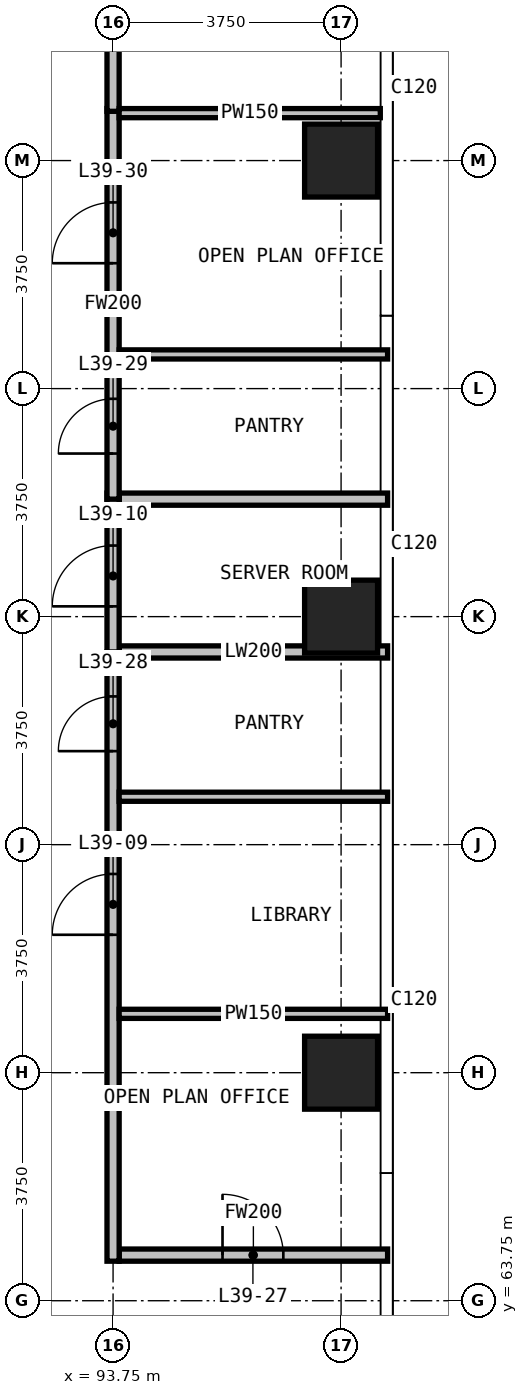
"""IFC4 building model, lengths in metres.
Left out: names, types, materials, properties, quantities, classifications, styles, units other than length and angle.
Written with IfcOpenShell. Run it as: python <this file> out.ifc"""

import sys

from ifc_helpers import new_model, si_unit, direction, frame, frame_2d, origin, origin_2d, place, context, subcontext, project, spatial, rectangle, extrude, element, fill, save


model = new_model("IFC4")
c1 = context("Model", 3, precision=1e-05, world=origin(), true_north=direction((0.0, 1.0)))
c2 = subcontext(c1, "Body", "Model", "MODEL_VIEW")
j1 = project(units=[si_unit("LENGTHUNIT", "METRE"), si_unit("PLANEANGLEUNIT", "RADIAN")], contexts=[c1])
p1 = place(None, origin())
s1 = spatial("IfcSite", under=j1, at=p1, CompositionType="ELEMENT")
p2 = place(p1, origin())
s2 = spatial("IfcBuilding", under=s1, at=p2, CompositionType="ELEMENT")
p3 = place(p2, frame((0.0, 0.0, 154.9)))
s3 = spatial("IfcBuildingStorey", under=s2, at=p3, CompositionType="ELEMENT", Elevation=154.9)
for number, where, z_axis, x_axis in (
    (1, (97.5, 67.5, 0.0), (0.0, 0.0, 1.0), (1.0, 0.0, 0.0)),
    (2, (97.5, 75.0, 0.0), (0.0, 0.0, 1.0), (1.0, 0.0, 0.0)),
    (3, (97.5, 82.5, 0.0), (0.0, 0.0, 1.0), (1.0, 0.0, 0.0)),
):
    element("IfcColumn", number, at=place(p3, frame(where, z_axis=z_axis, x_axis=x_axis)), inside=s3, PredefinedType="COLUMN", context=c2, shape_type="SweptSolid", body=[
        extrude(rectangle(XDim=1.2, YDim=1.2, at=origin_2d()), origin(), (0.0, 0.0, 1.0), 3.6),
    ])
for number, where, z_axis, x_axis in (
    (4, (93.85, 74.419, 0.0), (0.0, 0.0, 1.0), (1.0, 0.0, 0.0)),
    (5, (93.85, 76.932, 0.0), (0.0, 0.0, 1.0), (1.0, 0.0, 0.0)),
):
    element("IfcWall", number, at=place(p3, frame(where, z_axis=z_axis, x_axis=x_axis)), inside=s3, PredefinedType="PARTITIONING", context=c2, shape_type="SweptSolid", body=[
        extrude(rectangle(XDim=4.415, YDim=0.2, at=frame_2d((2.208, 0.0))), origin(), (0.0, 0.0, 1.0), 3.3),
    ])
p4 = place(p3, frame((93.75, 74.319, 0.0), z_axis=(0.0, 0.0, 1.0), x_axis=(0.0, 1.0, 0.0)))
e6 = element("IfcWall", 6, at=p4, inside=s3, PredefinedType="PARTITIONING", context=c2, shape_type="SweptSolid", body=[
    extrude(rectangle(XDim=2.713, YDim=0.2, at=frame_2d((1.356, 0.0))), origin(), (0.0, 0.0, 1.0), 3.3),
])
p5 = place(p4, frame((0.85, 0.0, 0.0)))
e7 = element("IfcOpeningElement", 7, at=p5, cuts=e6, PredefinedType="OPENING", context=c2, shape_type="SweptSolid", body=[
    extrude(rectangle(XDim=1.0, YDim=2.2, at=frame_2d((0.5, 1.1))), frame((0.0, 0.11, 0.0), z_axis=(0.0, -1.0, 0.0), x_axis=(1.0, 0.0, 0.0)), (0.0, 0.0, 1.0), 0.22),
])
p6 = place(p3, frame((93.85, 64.5, 0.0), z_axis=(0.0, 0.0, 1.0), x_axis=(1.0, 0.0, 0.0)))
e8 = element("IfcWall", 8, at=p6, inside=s3, PredefinedType="PARTITIONING", context=c2, shape_type="SweptSolid", body=[
    extrude(rectangle(XDim=4.415, YDim=0.2, at=frame_2d((2.208, 0.0))), origin(), (0.0, 0.0, 1.0), 3.3),
])
p7 = place(p6, frame((1.7, 0.0, 0.0)))
e9 = element("IfcOpeningElement", 9, at=p7, cuts=e8, PredefinedType="OPENING", context=c2, shape_type="SweptSolid", body=[
    extrude(rectangle(XDim=1.0, YDim=2.2, at=frame_2d((0.5, 1.1))), frame((0.0, 0.11, 0.0), z_axis=(0.0, -1.0, 0.0), x_axis=(1.0, 0.0, 0.0)), (0.0, 0.0, 1.0), 0.22),
])
p8 = place(p3, frame((93.75, 64.4, 0.0), z_axis=(0.0, 0.0, 1.0), x_axis=(0.0, 1.0, 0.0)))
e10 = element("IfcWall", 10, at=p8, inside=s3, PredefinedType="PARTITIONING", context=c2, shape_type="SweptSolid", body=[
    extrude(rectangle(XDim=10.019, YDim=0.2, at=frame_2d((5.01, 0.0))), origin(), (0.0, 0.0, 1.0), 3.3),
])
p9 = place(p8, frame((5.368, 0.0, 0.0)))
e11 = element("IfcOpeningElement", 11, at=p9, cuts=e10, PredefinedType="OPENING", context=c2, shape_type="SweptSolid", body=[
    extrude(rectangle(XDim=1.0, YDim=2.2, at=frame_2d((0.5, 1.1))), frame((0.0, 0.11, 0.0), z_axis=(0.0, -1.0, 0.0), x_axis=(1.0, 0.0, 0.0)), (0.0, 0.0, 1.0), 0.22),
])
p10 = place(p8, frame((8.388, 0.0, 0.0)))
e12 = element("IfcOpeningElement", 12, at=p10, cuts=e10, PredefinedType="OPENING", context=c2, shape_type="SweptSolid", body=[
    extrude(rectangle(XDim=0.9, YDim=2.2, at=frame_2d((0.45, 1.1))), frame((0.0, 0.11, 0.0), z_axis=(0.0, -1.0, 0.0), x_axis=(1.0, 0.0, 0.0)), (0.0, 0.0, 1.0), 0.22),
])
p11 = place(p3, frame((93.75, 76.932, 0.0), z_axis=(0.0, 0.0, 1.0), x_axis=(0.0, 1.0, 0.0)))
e13 = element("IfcWall", 13, at=p11, inside=s3, PredefinedType="PARTITIONING", context=c2, shape_type="SweptSolid", body=[
    extrude(rectangle(XDim=6.423, YDim=0.2, at=frame_2d((3.211, 0.0))), origin(), (0.0, 0.0, 1.0), 3.3),
])
p12 = place(p11, frame((0.75, 0.0, 0.0)))
e14 = element("IfcOpeningElement", 14, at=p12, cuts=e13, PredefinedType="OPENING", context=c2, shape_type="SweptSolid", body=[
    extrude(rectangle(XDim=0.9, YDim=2.2, at=frame_2d((0.45, 1.1))), frame((0.0, 0.11, 0.0), z_axis=(0.0, -1.0, 0.0), x_axis=(1.0, 0.0, 0.0)), (0.0, 0.0, 1.0), 0.22),
])
p13 = place(p11, frame((3.88, 0.0, 0.0)))
e15 = element("IfcOpeningElement", 15, at=p13, cuts=e13, PredefinedType="OPENING", context=c2, shape_type="SweptSolid", body=[
    extrude(rectangle(XDim=1.0, YDim=2.2, at=frame_2d((0.5, 1.1))), frame((0.0, 0.11, 0.0), z_axis=(0.0, -1.0, 0.0), x_axis=(1.0, 0.0, 0.0)), (0.0, 0.0, 1.0), 0.22),
])
p14 = place(p3, frame((93.75, 83.31, 0.0), z_axis=(0.0, 0.0, 1.0), x_axis=(0.0, 1.0, 0.0)))
e16 = element("IfcWall", 16, at=p14, inside=s3, PredefinedType="PARTITIONING", context=c2, shape_type="SweptSolid", body=[
    extrude(rectangle(XDim=7.335, YDim=0.2, at=frame_2d((3.667, 0.0))), origin(), (0.0, 0.0, 1.0), 3.3),
])
for number, where, z_axis, x_axis in (
    (17, (93.85, 68.468, 0.0), (0.0, 0.0, 1.0), (1.0, 0.0, 0.0)),
    (18, (93.85, 72.038, 0.0), (0.0, 0.0, 1.0), (1.0, 0.0, 0.0)),
    (19, (93.85, 79.312, 0.0), (0.0, 0.0, 1.0), (1.0, 0.0, 0.0)),
):
    element("IfcWall", number, at=place(p3, frame(where, z_axis=z_axis, x_axis=x_axis)), inside=s3, PredefinedType="PARTITIONING", context=c2, shape_type="SweptSolid", body=[
        extrude(rectangle(XDim=4.415, YDim=0.15, at=frame_2d((2.208, 0.0))), origin(), (0.0, 0.0, 1.0), 3.3),
    ])
p15 = place(p3, frame((93.85, 83.28, 0.0), z_axis=(0.0, 0.0, 1.0), x_axis=(1.0, 0.0, 0.0)))
e20 = element("IfcWall", 20, at=p15, inside=s3, PredefinedType="PARTITIONING", context=c2, shape_type="SweptSolid", body=[
    extrude(rectangle(XDim=4.295, YDim=0.15, at=frame_2d((2.147, 0.0))), origin(), (0.0, 0.0, 1.0), 3.3),
])
p16 = place(p9, origin())
e21 = element("IfcDoor", 21, at=p16, inside=s3, OperationType="SINGLE_SWING_RIGHT", PredefinedType="DOOR", context=c2, shape_type="SweptSolid", body=[
    extrude(rectangle(XDim=1.0, YDim=2.2, at=frame_2d((0.5, 1.1))), frame((0.0, 0.025, 0.0), z_axis=(0.0, -1.0, 0.0), x_axis=(1.0, 0.0, 0.0)), (0.0, 0.0, 1.0), 0.05),
])
fill(e11, e21)
p17 = place(p5, origin())
e22 = element("IfcDoor", 22, at=p17, inside=s3, OperationType="SINGLE_SWING_LEFT", PredefinedType="DOOR", context=c2, shape_type="SweptSolid", body=[
    extrude(rectangle(XDim=1.0, YDim=2.2, at=frame_2d((0.5, 1.1))), frame((0.0, 0.025, 0.0), z_axis=(0.0, -1.0, 0.0), x_axis=(1.0, 0.0, 0.0)), (0.0, 0.0, 1.0), 0.05),
])
fill(e7, e22)
p18 = place(p7, origin())
e23 = element("IfcDoor", 23, at=p18, inside=s3, OperationType="SINGLE_SWING_LEFT", PredefinedType="DOOR", context=c2, shape_type="SweptSolid", body=[
    extrude(rectangle(XDim=1.0, YDim=2.2, at=frame_2d((0.5, 1.1))), frame((0.0, 0.025, 0.0), z_axis=(0.0, -1.0, 0.0), x_axis=(1.0, 0.0, 0.0)), (0.0, 0.0, 1.0), 0.05),
])
fill(e9, e23)
p19 = place(p10, origin())
e24 = element("IfcDoor", 24, at=p19, inside=s3, OperationType="SINGLE_SWING_LEFT", PredefinedType="DOOR", context=c2, shape_type="SweptSolid", body=[
    extrude(rectangle(XDim=0.9, YDim=2.2, at=frame_2d((0.45, 1.1))), frame((0.0, 0.025, 0.0), z_axis=(0.0, -1.0, 0.0), x_axis=(1.0, 0.0, 0.0)), (0.0, 0.0, 1.0), 0.05),
])
fill(e12, e24)
p20 = place(p12, origin())
e25 = element("IfcDoor", 25, at=p20, inside=s3, OperationType="SINGLE_SWING_LEFT", PredefinedType="DOOR", context=c2, shape_type="SweptSolid", body=[
    extrude(rectangle(XDim=0.9, YDim=2.2, at=frame_2d((0.45, 1.1))), frame((0.0, 0.025, 0.0), z_axis=(0.0, -1.0, 0.0), x_axis=(1.0, 0.0, 0.0)), (0.0, 0.0, 1.0), 0.05),
])
fill(e14, e25)
p21 = place(p13, origin())
e26 = element("IfcDoor", 26, at=p21, inside=s3, OperationType="SINGLE_SWING_LEFT", PredefinedType="DOOR", context=c2, shape_type="SweptSolid", body=[
    extrude(rectangle(XDim=1.0, YDim=2.2, at=frame_2d((0.5, 1.1))), frame((0.0, 0.025, 0.0), z_axis=(0.0, -1.0, 0.0), x_axis=(1.0, 0.0, 0.0)), (0.0, 0.0, 1.0), 0.05),
])
fill(e15, e26)
save(model, sys.argv[1])
